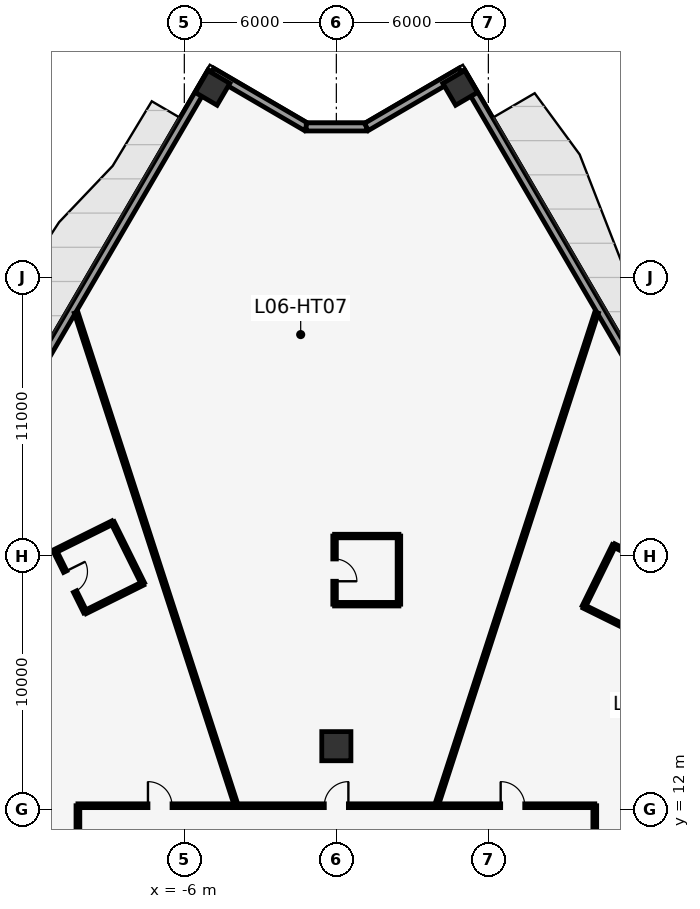
"""IFC4 building model, lengths in metres.
Left out: names, types, materials, properties, quantities, classifications, styles, units other than length and angle.
Written with IfcOpenShell. Run it as: python <this file> out.ifc"""

import sys

from ifc_helpers import new_model, si_unit, direction, frame, frame_2d, origin, origin_2d, place, context, subcontext, project, spatial, rectangle, hollow_rectangle, extrude, element, fill, save


model = new_model("IFC4")
c1 = context("Model", 3, precision=1e-05, world=origin(), true_north=direction((0.0, 1.0)))
c2 = subcontext(c1, "Body", "Model", "MODEL_VIEW")
j1 = project(units=[si_unit("LENGTHUNIT", "METRE"), si_unit("PLANEANGLEUNIT", "RADIAN")], contexts=[c1])
p1 = place(None, origin())
s1 = spatial("IfcSite", under=j1, at=p1, CompositionType="ELEMENT")
p2 = place(p1, origin())
s2 = spatial("IfcBuilding", under=s1, at=p2, CompositionType="ELEMENT")
p3 = place(p2, frame((0.0, 0.0, 34.4)))
s3 = spatial("IfcBuildingStorey", under=s2, at=p3, CompositionType="ELEMENT", Elevation=34.4)
p4 = place(p3, frame((0.0, 14.5, 0.0), z_axis=(0.0, 0.0, 1.0), x_axis=(1.0, 0.0, 0.0)))
e1 = element("IfcColumn", 1, at=p4, inside=s3, PredefinedType="COLUMN", context=c2, shape_type="SweptSolid", body=[
    extrude(rectangle(XDim=1.15, YDim=1.15, at=origin_2d()), origin(), (0.0, 0.0, 1.0), 4.0),
])
for number, where, z_axis, x_axis in (
    (2, (-4.887, 40.481, 0.0), (0.0, 0.0, 1.0), (0.504, 0.863, 0.0)),
    (3, (4.887, 40.481, 0.0), (0.0, 0.0, 1.0), (-0.504, 0.863, 0.0)),
):
    element("IfcColumn", number, at=place(p3, frame(where, z_axis=z_axis, x_axis=x_axis)), inside=s3, PredefinedType="COLUMN", context=c2, shape_type="SweptSolid", body=[
        extrude(hollow_rectangle(XDim=1.0, YDim=1.0, WallThickness=0.06, at=origin_2d()), origin(), (0.0, 0.0, 1.0), 4.0),
    ])
p5 = place(p3, frame((4.923, 41.122, 0.0), z_axis=(0.0, 0.0, 1.0), x_axis=(0.504213113214, -0.863579258935, 0.0)))
e4 = element("IfcWall", 4, at=p5, inside=s3, PredefinedType="STANDARD", context=c2, shape_type="SweptSolid", body=[
    extrude(rectangle(XDim=67.041, YDim=0.32, at=frame_2d((33.521, 0.0))), origin(), (0.0, 0.0, 1.0), 3.75),
])
p6 = place(p5, frame((33.021, 0.0, 0.0)))
e5 = element("IfcOpeningElement", 5, at=p6, cuts=e4, PredefinedType="OPENING", context=c2, shape_type="SweptSolid", body=[
    extrude(rectangle(XDim=1.0, YDim=2.15, at=frame_2d((0.5, 1.075))), frame((0.0, 0.17, 0.0), z_axis=(0.0, -1.0, 0.0), x_axis=(1.0, 0.0, 0.0)), (0.0, 0.0, 1.0), 0.34),
])
p7 = place(p3, frame((-38.726, -16.773, 0.0), z_axis=(0.0, 0.0, 1.0), x_axis=(0.504213113214, 0.863579258935, 0.0)))
e6 = element("IfcWall", 6, at=p7, inside=s3, PredefinedType="STANDARD", context=c2, shape_type="SweptSolid", body=[
    extrude(rectangle(XDim=67.041, YDim=0.32, at=frame_2d((33.521, 0.0))), origin(), (0.0, 0.0, 1.0), 3.75),
])
p8 = place(p7, frame((33.021, 0.0, 0.0)))
e7 = element("IfcOpeningElement", 7, at=p8, cuts=e6, PredefinedType="OPENING", context=c2, shape_type="SweptSolid", body=[
    extrude(rectangle(XDim=1.0, YDim=2.15, at=frame_2d((0.5, 1.075))), frame((0.0, 0.17, 0.0), z_axis=(0.0, -1.0, 0.0), x_axis=(1.0, 0.0, 0.0)), (0.0, 0.0, 1.0), 0.34),
])
p9 = place(p3, frame((-4.923, 41.122, 0.0), z_axis=(0.0, 0.0, 1.0), x_axis=(0.863588414101, -0.50419743259, 0.0)))
e8 = element("IfcWall", 8, at=p9, inside=s3, PredefinedType="STANDARD", context=c2, shape_type="SweptSolid", body=[
    extrude(rectangle(XDim=4.324, YDim=0.32, at=frame_2d((2.162, 0.0))), origin(), (0.0, 0.0, 1.0), 3.75),
])
p10 = place(p3, frame((-1.188, 38.941, 0.0), z_axis=(0.0, 0.0, 1.0), x_axis=(1.0, 0.0, 0.0)))
e9 = element("IfcWall", 9, at=p10, inside=s3, PredefinedType="STANDARD", context=c2, shape_type="SweptSolid", body=[
    extrude(rectangle(XDim=2.376, YDim=0.32, at=frame_2d((1.188, 0.0))), origin(), (0.0, 0.0, 1.0), 3.75),
])
p11 = place(p3, frame((1.188, 38.941, 0.0), z_axis=(0.0, 0.0, 1.0), x_axis=(0.863588414101, 0.50419743259, 0.0)))
e10 = element("IfcWall", 10, at=p11, inside=s3, PredefinedType="STANDARD", context=c2, shape_type="SweptSolid", body=[
    extrude(rectangle(XDim=4.324, YDim=0.32, at=frame_2d((2.162, 0.0))), origin(), (0.0, 0.0, 1.0), 3.75),
])
p12 = place(p3, frame((-10.2, 12.15, 0.0), z_axis=(0.0, 0.0, 1.0), x_axis=(1.0, 0.0, 0.0)))
e11 = element("IfcWall", 11, at=p12, inside=s3, PredefinedType="PARTITIONING", context=c2, shape_type="SweptSolid", body=[
    extrude(rectangle(XDim=20.4, YDim=0.15, at=frame_2d((10.2, 0.0))), origin(), (0.0, 0.0, 1.0), 3.75),
])
p13 = place(p12, frame((16.686, 0.0, 0.0)))
e12 = element("IfcOpeningElement", 12, at=p13, cuts=e11, PredefinedType="OPENING", context=c2, shape_type="SweptSolid", body=[
    extrude(rectangle(XDim=0.95, YDim=2.15, at=frame_2d((0.475, 1.075))), frame((0.0, 0.085, 0.0), z_axis=(0.0, -1.0, 0.0), x_axis=(1.0, 0.0, 0.0)), (0.0, 0.0, 1.0), 0.17),
])
p14 = place(p12, frame((9.725, 0.0, 0.0)))
e13 = element("IfcOpeningElement", 13, at=p14, cuts=e11, PredefinedType="OPENING", context=c2, shape_type="SweptSolid", body=[
    extrude(rectangle(XDim=0.95, YDim=2.15, at=frame_2d((0.475, 1.075))), frame((0.0, 0.085, 0.0), z_axis=(0.0, -1.0, 0.0), x_axis=(1.0, 0.0, 0.0)), (0.0, 0.0, 1.0), 0.17),
])
p15 = place(p12, frame((2.764, 0.0, 0.0)))
e14 = element("IfcOpeningElement", 14, at=p15, cuts=e11, PredefinedType="OPENING", context=c2, shape_type="SweptSolid", body=[
    extrude(rectangle(XDim=0.95, YDim=2.15, at=frame_2d((0.475, 1.075))), frame((0.0, 0.085, 0.0), z_axis=(0.0, -1.0, 0.0), x_axis=(1.0, 0.0, 0.0)), (0.0, 0.0, 1.0), 0.17),
])
p16 = place(p3, frame((10.2, 12.15, 0.0), z_axis=(0.0, 0.0, 1.0), x_axis=(0.0, -1.0, 0.0)))
e15 = element("IfcWall", 15, at=p16, inside=s3, PredefinedType="PARTITIONING", context=c2, shape_type="SweptSolid", body=[
    extrude(rectangle(XDim=24.0, YDim=0.15, at=frame_2d((12.0, 0.0))), origin(), (0.0, 0.0, 1.0), 3.75),
])
p17 = place(p16, frame((20.211, 0.0, 0.0)))
e16 = element("IfcOpeningElement", 16, at=p17, cuts=e15, PredefinedType="OPENING", context=c2, shape_type="SweptSolid", body=[
    extrude(rectangle(XDim=0.95, YDim=2.15, at=frame_2d((0.475, 1.075))), frame((0.0, 0.085, 0.0), z_axis=(0.0, -1.0, 0.0), x_axis=(1.0, 0.0, 0.0)), (0.0, 0.0, 1.0), 0.17),
])
p18 = place(p16, frame((14.05, 0.0, 0.0)))
e17 = element("IfcOpeningElement", 17, at=p18, cuts=e15, PredefinedType="OPENING", context=c2, shape_type="SweptSolid", body=[
    extrude(rectangle(XDim=0.95, YDim=2.15, at=frame_2d((0.475, 1.075))), frame((0.0, 0.085, 0.0), z_axis=(0.0, -1.0, 0.0), x_axis=(1.0, 0.0, 0.0)), (0.0, 0.0, 1.0), 0.17),
])
p19 = place(p16, frame((7.292, 0.0, 0.0)))
e18 = element("IfcOpeningElement", 18, at=p19, cuts=e15, PredefinedType="OPENING", context=c2, shape_type="SweptSolid", body=[
    extrude(rectangle(XDim=0.95, YDim=2.15, at=frame_2d((0.475, 1.075))), frame((0.0, 0.085, 0.0), z_axis=(0.0, -1.0, 0.0), x_axis=(1.0, 0.0, 0.0)), (0.0, 0.0, 1.0), 0.17),
])
p20 = place(p3, frame((-10.2, -11.85, 0.0), z_axis=(0.0, 0.0, 1.0), x_axis=(0.0, 1.0, 0.0)))
e19 = element("IfcWall", 19, at=p20, inside=s3, PredefinedType="PARTITIONING", context=c2, shape_type="SweptSolid", body=[
    extrude(rectangle(XDim=24.0, YDim=0.15, at=frame_2d((12.0, 0.0))), origin(), (0.0, 0.0, 1.0), 3.75),
])
p21 = place(p20, frame((6.372, 0.0, 0.0)))
e20 = element("IfcOpeningElement", 20, at=p21, cuts=e19, PredefinedType="OPENING", context=c2, shape_type="SweptSolid", body=[
    extrude(rectangle(XDim=0.95, YDim=2.15, at=frame_2d((0.475, 1.075))), frame((0.0, 0.085, 0.0), z_axis=(0.0, -1.0, 0.0), x_axis=(1.0, 0.0, 0.0)), (0.0, 0.0, 1.0), 0.17),
])
p22 = place(p20, frame((14.489, 0.0, 0.0)))
e21 = element("IfcOpeningElement", 21, at=p22, cuts=e19, PredefinedType="OPENING", context=c2, shape_type="SweptSolid", body=[
    extrude(rectangle(XDim=0.95, YDim=2.15, at=frame_2d((0.475, 1.075))), frame((0.0, 0.085, 0.0), z_axis=(0.0, -1.0, 0.0), x_axis=(1.0, 0.0, 0.0)), (0.0, 0.0, 1.0), 0.17),
])
p23 = place(p3, frame((10.305, 8.051, 0.0), z_axis=(0.0, 0.0, 1.0), x_axis=(0.788008281042, 0.615664640051, 0.0)))
e22 = element("IfcWall", 22, at=p23, inside=s3, PredefinedType="PARTITIONING", context=c2, shape_type="SweptSolid", body=[
    extrude(rectangle(XDim=11.96, YDim=0.15, at=frame_2d((5.98, 0.0))), origin(), (0.0, 0.0, 1.0), 3.75),
])
for number, where, z_axis, x_axis in (
    (23, (3.982, 12.255, 0.0), (0.0, 0.0, 1.0), (0.309, 0.951, 0.0)),
    (24, (-3.982, 12.255, 0.0), (0.0, 0.0, 1.0), (-0.309, 0.951, 0.0)),
):
    element("IfcWall", number, at=place(p3, frame(where, z_axis=z_axis, x_axis=x_axis)), inside=s3, PredefinedType="PARTITIONING", context=c2, shape_type="SweptSolid", body=[
        extrude(rectangle(XDim=20.354, YDim=0.15, at=frame_2d((10.177, 0.0))), origin(), (0.0, 0.0, 1.0), 3.75),
    ])
p24 = place(p3, frame((-10.305, 6.951, 0.0), z_axis=(0.0, 0.0, 1.0), x_axis=(-0.829038255968, 0.559191890268, 0.0)))
e25 = element("IfcWall", 25, at=p24, inside=s3, PredefinedType="PARTITIONING", context=c2, shape_type="SweptSolid", body=[
    extrude(rectangle(XDim=12.433, YDim=0.15, at=frame_2d((6.216, 0.0))), origin(), (0.0, 0.0, 1.0), 3.75),
])
p25 = place(p3, frame((13.234, 21.304, 0.0), z_axis=(0.0, 0.0, 1.0), x_axis=(-0.897273198593, 0.441475715173, 0.0)))
e26 = element("IfcWall", 26, at=p25, inside=s3, PredefinedType="PARTITIONING", context=c2, shape_type="SweptSolid", body=[
    extrude(rectangle(XDim=2.54, YDim=0.14, at=frame_2d((1.27, 0.0))), origin(), (0.0, 0.0, 1.0), 3.75),
])
p26 = place(p3, frame((10.955, 22.425, 0.0), z_axis=(0.0, 0.0, 1.0), x_axis=(-0.441541285032, -0.897240933982, 0.0)))
e27 = element("IfcWall", 27, at=p26, inside=s3, PredefinedType="PARTITIONING", context=c2, shape_type="SweptSolid", body=[
    extrude(rectangle(XDim=2.69, YDim=0.14, at=frame_2d((1.345, 0.0))), origin(), (0.0, 0.0, 1.0), 3.75),
])
p27 = place(p3, frame((9.767, 20.011, 0.0), z_axis=(0.0, 0.0, 1.0), x_axis=(0.897235121698, -0.441553095777, 0.0)))
e28 = element("IfcWall", 28, at=p27, inside=s3, PredefinedType="PARTITIONING", context=c2, shape_type="SweptSolid", body=[
    extrude(rectangle(XDim=2.54, YDim=0.14, at=frame_2d((1.27, 0.0))), origin(), (0.0, 0.0, 1.0), 3.75),
])
p28 = place(p3, frame((2.47, 20.104, 0.0), z_axis=(0.0, 0.0, 1.0), x_axis=(0.0, 1.0, 0.0)))
e29 = element("IfcWall", 29, at=p28, inside=s3, PredefinedType="PARTITIONING", context=c2, shape_type="SweptSolid", body=[
    extrude(rectangle(XDim=2.69, YDim=0.14, at=frame_2d((1.345, 0.0))), origin(), (0.0, 0.0, 1.0), 3.75),
])
p29 = place(p3, frame((2.47, 22.794, 0.0), z_axis=(0.0, 0.0, 1.0), x_axis=(-1.0, 0.0, 0.0)))
e30 = element("IfcWall", 30, at=p29, inside=s3, PredefinedType="PARTITIONING", context=c2, shape_type="SweptSolid", body=[
    extrude(rectangle(XDim=2.54, YDim=0.14, at=frame_2d((1.27, 0.0))), origin(), (0.0, 0.0, 1.0), 3.75),
])
p30 = place(p3, frame((-0.07, 22.794, 0.0), z_axis=(0.0, 0.0, 1.0), x_axis=(0.0, -1.0, 0.0)))
e31 = element("IfcWall", 31, at=p30, inside=s3, PredefinedType="PARTITIONING", context=c2, shape_type="SweptSolid", body=[
    extrude(rectangle(XDim=2.69, YDim=0.14, at=frame_2d((1.345, 0.0))), origin(), (0.0, 0.0, 1.0), 3.75),
])
p31 = place(p30, frame((0.905, 0.0, 0.0)))
e32 = element("IfcOpeningElement", 32, at=p31, cuts=e31, PredefinedType="OPENING", context=c2, shape_type="SweptSolid", body=[
    extrude(rectangle(XDim=0.88, YDim=2.1, at=frame_2d((0.44, 1.05))), frame((0.0, 0.08, 0.0), z_axis=(0.0, -1.0, 0.0), x_axis=(1.0, 0.0, 0.0)), (0.0, 0.0, 1.0), 0.16),
])
p32 = place(p3, frame((-0.07, 20.104, 0.0), z_axis=(0.0, 0.0, 1.0), x_axis=(1.0, 0.0, 0.0)))
e33 = element("IfcWall", 33, at=p32, inside=s3, PredefinedType="PARTITIONING", context=c2, shape_type="SweptSolid", body=[
    extrude(rectangle(XDim=2.54, YDim=0.14, at=frame_2d((1.27, 0.0))), origin(), (0.0, 0.0, 1.0), 3.75),
])
p33 = place(p3, frame((-7.635, 20.92, 0.0), z_axis=(0.0, 0.0, 1.0), x_axis=(-0.444598005218, 0.895730212595, 0.0)))
e34 = element("IfcWall", 34, at=p33, inside=s3, PredefinedType="PARTITIONING", context=c2, shape_type="SweptSolid", body=[
    extrude(rectangle(XDim=2.69, YDim=0.14, at=frame_2d((1.345, 0.0))), origin(), (0.0, 0.0, 1.0), 3.75),
])
p34 = place(p3, frame((-8.831, 23.33, 0.0), z_axis=(0.0, 0.0, 1.0), x_axis=(-0.895711445352, -0.444635813521, 0.0)))
e35 = element("IfcWall", 35, at=p34, inside=s3, PredefinedType="PARTITIONING", context=c2, shape_type="SweptSolid", body=[
    extrude(rectangle(XDim=2.54, YDim=0.14, at=frame_2d((1.27, 0.0))), origin(), (0.0, 0.0, 1.0), 3.75),
])
p35 = place(p3, frame((-11.106, 22.2, 0.0), z_axis=(0.0, 0.0, 1.0), x_axis=(0.444706961712, -0.895676123498, 0.0)))
e36 = element("IfcWall", 36, at=p35, inside=s3, PredefinedType="PARTITIONING", context=c2, shape_type="SweptSolid", body=[
    extrude(rectangle(XDim=2.69, YDim=0.14, at=frame_2d((1.345, 0.0))), origin(), (0.0, 0.0, 1.0), 3.75),
])
p36 = place(p35, frame((0.905, 0.0, 0.0)))
e37 = element("IfcOpeningElement", 37, at=p36, cuts=e36, PredefinedType="OPENING", context=c2, shape_type="SweptSolid", body=[
    extrude(rectangle(XDim=0.88, YDim=2.1, at=frame_2d((0.44, 1.05))), frame((0.0, 0.08, 0.0), z_axis=(0.0, -1.0, 0.0), x_axis=(1.0, 0.0, 0.0)), (0.0, 0.0, 1.0), 0.16),
])
p37 = place(p3, frame((-9.909, 19.791, 0.0), z_axis=(0.0, 0.0, 1.0), x_axis=(0.895730724579, 0.444596973726, 0.0)))
e38 = element("IfcWall", 38, at=p37, inside=s3, PredefinedType="PARTITIONING", context=c2, shape_type="SweptSolid", body=[
    extrude(rectangle(XDim=2.54, YDim=0.14, at=frame_2d((1.27, 0.0))), origin(), (0.0, 0.0, 1.0), 3.75),
])
p38 = place(p31, origin())
e39 = element("IfcDoor", 39, at=p38, inside=s3, OperationType="SINGLE_SWING_RIGHT", PredefinedType="DOOR", context=c2, shape_type="SweptSolid", body=[
    extrude(rectangle(XDim=0.88, YDim=2.1, at=frame_2d((0.44, 1.05))), frame((0.0, 0.025, 0.0), z_axis=(0.0, -1.0, 0.0), x_axis=(1.0, 0.0, 0.0)), (0.0, 0.0, 1.0), 0.05),
])
fill(e32, e39)
p39 = place(p36, origin())
e40 = element("IfcDoor", 40, at=p39, inside=s3, OperationType="SINGLE_SWING_LEFT", PredefinedType="DOOR", context=c2, shape_type="SweptSolid", body=[
    extrude(rectangle(XDim=0.88, YDim=2.1, at=frame_2d((0.44, 1.05))), frame((0.0, 0.025, 0.0), z_axis=(0.0, -1.0, 0.0), x_axis=(1.0, 0.0, 0.0)), (0.0, 0.0, 1.0), 0.05),
])
fill(e37, e40)
p40 = place(p13, origin())
e41 = element("IfcDoor", 41, at=p40, inside=s3, OperationType="SINGLE_SWING_LEFT", PredefinedType="DOOR", context=c2, shape_type="SweptSolid", body=[
    extrude(rectangle(XDim=0.95, YDim=2.15, at=frame_2d((0.475, 1.075))), frame((0.0, 0.025, 0.0), z_axis=(0.0, -1.0, 0.0), x_axis=(1.0, 0.0, 0.0)), (0.0, 0.0, 1.0), 0.05),
])
fill(e12, e41)
p41 = place(p14, origin())
e42 = element("IfcDoor", 42, at=p41, inside=s3, OperationType="SINGLE_SWING_RIGHT", PredefinedType="DOOR", context=c2, shape_type="SweptSolid", body=[
    extrude(rectangle(XDim=0.95, YDim=2.15, at=frame_2d((0.475, 1.075))), frame((0.0, 0.025, 0.0), z_axis=(0.0, -1.0, 0.0), x_axis=(1.0, 0.0, 0.0)), (0.0, 0.0, 1.0), 0.05),
])
fill(e13, e42)
p42 = place(p15, origin())
e43 = element("IfcDoor", 43, at=p42, inside=s3, OperationType="SINGLE_SWING_LEFT", PredefinedType="DOOR", context=c2, shape_type="SweptSolid", body=[
    extrude(rectangle(XDim=0.95, YDim=2.15, at=frame_2d((0.475, 1.075))), frame((0.0, 0.025, 0.0), z_axis=(0.0, -1.0, 0.0), x_axis=(1.0, 0.0, 0.0)), (0.0, 0.0, 1.0), 0.05),
])
fill(e14, e43)
save(model, sys.argv[1])
